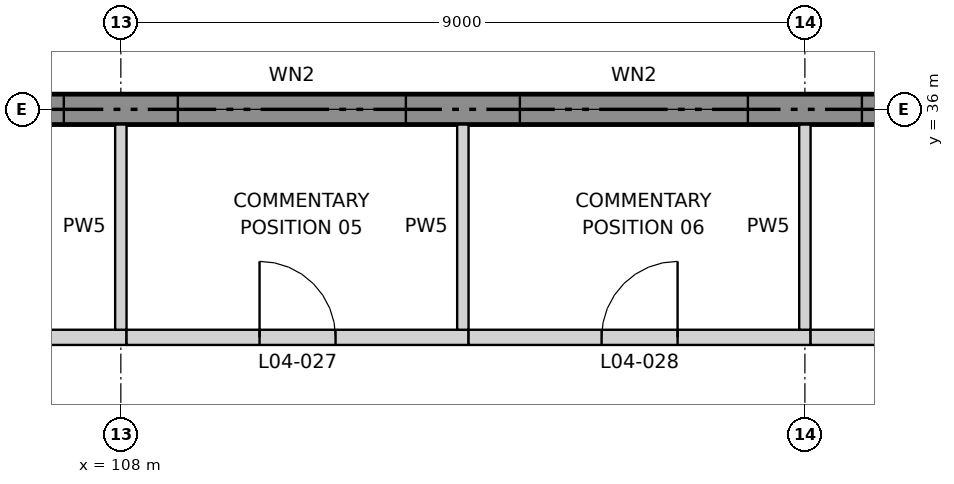
"""IFC4 building model, lengths in metres.
Left out: names, types, materials, properties, quantities, classifications, styles, units other than length and angle.
Written with IfcOpenShell. Run it as: python <this file> out.ifc"""

import sys

from ifc_helpers import new_model, si_unit, direction, frame, frame_2d, origin, place, context, subcontext, project, spatial, rectangle, extrude, element, fill, save


model = new_model("IFC4")
c1 = context("Model", 3, precision=1e-05, world=origin(), true_north=direction((0.0, 1.0)))
c2 = subcontext(c1, "Body", "Model", "MODEL_VIEW")
j1 = project(units=[si_unit("LENGTHUNIT", "METRE"), si_unit("PLANEANGLEUNIT", "RADIAN")], contexts=[c1])
p1 = place(None, origin())
s1 = spatial("IfcSite", under=j1, at=p1, CompositionType="ELEMENT")
p2 = place(p1, origin())
s2 = spatial("IfcBuilding", under=s1, at=p2, CompositionType="ELEMENT")
p3 = place(p2, frame((0.0, 0.0, 28.0)))
s3 = spatial("IfcBuildingStorey", under=s2, at=p3, CompositionType="ELEMENT", Elevation=28.0)
p4 = place(p3, frame((90.0, 36.0, 0.0), z_axis=(0.0, 0.0, 1.0), x_axis=(1.0, 0.0, 0.0)))
e1 = element("IfcWall", 1, at=p4, inside=s3, PredefinedType="SOLIDWALL", context=c2, shape_type="SweptSolid", body=[
    extrude(rectangle(XDim=81.0, YDim=0.4, at=frame_2d((40.5, 0.0))), origin(), (0.0, 0.0, 1.0), 5.5),
])
p5 = place(p4, frame((1.962, 0.0, 0.9)))
e2 = element("IfcOpeningElement", 2, at=p5, cuts=e1, PredefinedType="OPENING", context=c2, shape_type="SweptSolid", body=[
    extrude(rectangle(XDim=3.0, YDim=1.8, at=frame_2d((1.5, 0.9))), frame((0.0, 0.21, 0.0), z_axis=(0.0, -1.0, 0.0), x_axis=(1.0, 0.0, 0.0)), (0.0, 0.0, 1.0), 0.42),
])
p6 = place(p4, frame((5.25, 0.0, 0.9)))
e3 = element("IfcOpeningElement", 3, at=p6, cuts=e1, PredefinedType="OPENING", context=c2, shape_type="SweptSolid", body=[
    extrude(rectangle(XDim=3.0, YDim=1.8, at=frame_2d((1.5, 0.9))), frame((0.0, 0.21, 0.0), z_axis=(0.0, -1.0, 0.0), x_axis=(1.0, 0.0, 0.0)), (0.0, 0.0, 1.0), 0.42),
])
p7 = place(p4, frame((9.75, 0.0, 0.9)))
e4 = element("IfcOpeningElement", 4, at=p7, cuts=e1, PredefinedType="OPENING", context=c2, shape_type="SweptSolid", body=[
    extrude(rectangle(XDim=3.0, YDim=1.8, at=frame_2d((1.5, 0.9))), frame((0.0, 0.21, 0.0), z_axis=(0.0, -1.0, 0.0), x_axis=(1.0, 0.0, 0.0)), (0.0, 0.0, 1.0), 0.42),
])
p8 = place(p4, frame((14.25, 0.0, 0.9)))
e5 = element("IfcOpeningElement", 5, at=p8, cuts=e1, PredefinedType="OPENING", context=c2, shape_type="SweptSolid", body=[
    extrude(rectangle(XDim=3.0, YDim=1.8, at=frame_2d((1.5, 0.9))), frame((0.0, 0.21, 0.0), z_axis=(0.0, -1.0, 0.0), x_axis=(1.0, 0.0, 0.0)), (0.0, 0.0, 1.0), 0.42),
])
p9 = place(p4, frame((18.75, 0.0, 0.9)))
e6 = element("IfcOpeningElement", 6, at=p9, cuts=e1, PredefinedType="OPENING", context=c2, shape_type="SweptSolid", body=[
    extrude(rectangle(XDim=3.0, YDim=1.8, at=frame_2d((1.5, 0.9))), frame((0.0, 0.21, 0.0), z_axis=(0.0, -1.0, 0.0), x_axis=(1.0, 0.0, 0.0)), (0.0, 0.0, 1.0), 0.42),
])
p10 = place(p4, frame((23.25, 0.0, 0.9)))
e7 = element("IfcOpeningElement", 7, at=p10, cuts=e1, PredefinedType="OPENING", context=c2, shape_type="SweptSolid", body=[
    extrude(rectangle(XDim=3.0, YDim=1.8, at=frame_2d((1.5, 0.9))), frame((0.0, 0.21, 0.0), z_axis=(0.0, -1.0, 0.0), x_axis=(1.0, 0.0, 0.0)), (0.0, 0.0, 1.0), 0.42),
])
p11 = place(p4, frame((27.75, 0.0, 0.9)))
e8 = element("IfcOpeningElement", 8, at=p11, cuts=e1, PredefinedType="OPENING", context=c2, shape_type="SweptSolid", body=[
    extrude(rectangle(XDim=3.0, YDim=1.8, at=frame_2d((1.5, 0.9))), frame((0.0, 0.21, 0.0), z_axis=(0.0, -1.0, 0.0), x_axis=(1.0, 0.0, 0.0)), (0.0, 0.0, 1.0), 0.42),
])
p12 = place(p4, frame((32.238, 0.0, 0.9)))
e9 = element("IfcOpeningElement", 9, at=p12, cuts=e1, PredefinedType="OPENING", context=c2, shape_type="SweptSolid", body=[
    extrude(rectangle(XDim=3.0, YDim=1.8, at=frame_2d((1.5, 0.9))), frame((0.0, 0.21, 0.0), z_axis=(0.0, -1.0, 0.0), x_axis=(1.0, 0.0, 0.0)), (0.0, 0.0, 1.0), 0.42),
])
p13 = place(p4, frame((35.262, 0.0, 0.9)))
e10 = element("IfcOpeningElement", 10, at=p13, cuts=e1, PredefinedType="OPENING", context=c2, shape_type="SweptSolid", body=[
    extrude(rectangle(XDim=4.5, YDim=1.8, at=frame_2d((2.25, 0.9))), frame((0.0, 0.21, 0.0), z_axis=(0.0, -1.0, 0.0), x_axis=(1.0, 0.0, 0.0)), (0.0, 0.0, 1.0), 0.42),
])
p14 = place(p4, frame((41.262, 0.0, 0.9)))
e11 = element("IfcOpeningElement", 11, at=p14, cuts=e1, PredefinedType="OPENING", context=c2, shape_type="SweptSolid", body=[
    extrude(rectangle(XDim=4.5, YDim=1.8, at=frame_2d((2.25, 0.9))), frame((0.0, 0.21, 0.0), z_axis=(0.0, -1.0, 0.0), x_axis=(1.0, 0.0, 0.0)), (0.0, 0.0, 1.0), 0.42),
])
p15 = place(p4, frame((47.262, 0.0, 0.9)))
e12 = element("IfcOpeningElement", 12, at=p15, cuts=e1, PredefinedType="OPENING", context=c2, shape_type="SweptSolid", body=[
    extrude(rectangle(XDim=4.5, YDim=1.8, at=frame_2d((2.25, 0.9))), frame((0.0, 0.21, 0.0), z_axis=(0.0, -1.0, 0.0), x_axis=(1.0, 0.0, 0.0)), (0.0, 0.0, 1.0), 0.42),
])
p16 = place(p4, frame((53.262, 0.0, 0.9)))
e13 = element("IfcOpeningElement", 13, at=p16, cuts=e1, PredefinedType="OPENING", context=c2, shape_type="SweptSolid", body=[
    extrude(rectangle(XDim=4.5, YDim=1.8, at=frame_2d((2.25, 0.9))), frame((0.0, 0.21, 0.0), z_axis=(0.0, -1.0, 0.0), x_axis=(1.0, 0.0, 0.0)), (0.0, 0.0, 1.0), 0.42),
])
p17 = place(p4, frame((59.262, 0.0, 0.9)))
e14 = element("IfcOpeningElement", 14, at=p17, cuts=e1, PredefinedType="OPENING", context=c2, shape_type="SweptSolid", body=[
    extrude(rectangle(XDim=4.5, YDim=1.8, at=frame_2d((2.25, 0.9))), frame((0.0, 0.21, 0.0), z_axis=(0.0, -1.0, 0.0), x_axis=(1.0, 0.0, 0.0)), (0.0, 0.0, 1.0), 0.42),
])
p18 = place(p4, frame((75.9, 0.0, 0.0)))
e15 = element("IfcOpeningElement", 15, at=p18, cuts=e1, PredefinedType="OPENING", context=c2, shape_type="SweptSolid", body=[
    extrude(rectangle(XDim=1.2, YDim=2.1, at=frame_2d((0.6, 1.05))), frame((0.0, 0.21, 0.0), z_axis=(0.0, -1.0, 0.0), x_axis=(1.0, 0.0, 0.0)), (0.0, 0.0, 1.0), 0.42),
])
p19 = place(p4, frame((0.6, 0.0, 0.0)))
e16 = element("IfcOpeningElement", 16, at=p19, cuts=e1, PredefinedType="OPENING", context=c2, shape_type="SweptSolid", body=[
    extrude(rectangle(XDim=1.2, YDim=2.1, at=frame_2d((0.6, 1.05))), frame((0.0, 0.21, 0.0), z_axis=(0.0, -1.0, 0.0), x_axis=(1.0, 0.0, 0.0)), (0.0, 0.0, 1.0), 0.42),
])
p20 = place(p3, frame((103.575, 33.0, 0.0), z_axis=(0.0, 0.0, 1.0), x_axis=(1.0, 0.0, 0.0)))
e17 = element("IfcWall", 17, at=p20, inside=s3, PredefinedType="PARTITIONING", context=c2, shape_type="SweptSolid", body=[
    extrude(rectangle(XDim=4.5, YDim=0.2, at=frame_2d((2.25, 0.0))), origin(), (0.0, 0.0, 1.0), 5.5),
])
p21 = place(p20, frame((1.75, 0.0, 0.0)))
e18 = element("IfcOpeningElement", 18, at=p21, cuts=e17, PredefinedType="OPENING", context=c2, shape_type="SweptSolid", body=[
    extrude(rectangle(XDim=1.0, YDim=2.1, at=frame_2d((0.5, 1.05))), frame((0.0, 0.11, 0.0), z_axis=(0.0, -1.0, 0.0), x_axis=(1.0, 0.0, 0.0)), (0.0, 0.0, 1.0), 0.22),
])
p22 = place(p3, frame((108.075, 33.0, 0.0), z_axis=(0.0, 0.0, 1.0), x_axis=(1.0, 0.0, 0.0)))
e19 = element("IfcWall", 19, at=p22, inside=s3, PredefinedType="PARTITIONING", context=c2, shape_type="SweptSolid", body=[
    extrude(rectangle(XDim=4.5, YDim=0.2, at=frame_2d((2.25, 0.0))), origin(), (0.0, 0.0, 1.0), 5.5),
])
p23 = place(p22, frame((1.75, 0.0, 0.0)))
e20 = element("IfcOpeningElement", 20, at=p23, cuts=e19, PredefinedType="OPENING", context=c2, shape_type="SweptSolid", body=[
    extrude(rectangle(XDim=1.0, YDim=2.1, at=frame_2d((0.5, 1.05))), frame((0.0, 0.11, 0.0), z_axis=(0.0, -1.0, 0.0), x_axis=(1.0, 0.0, 0.0)), (0.0, 0.0, 1.0), 0.22),
])
p24 = place(p3, frame((112.575, 33.0, 0.0), z_axis=(0.0, 0.0, 1.0), x_axis=(1.0, 0.0, 0.0)))
e21 = element("IfcWall", 21, at=p24, inside=s3, PredefinedType="PARTITIONING", context=c2, shape_type="SweptSolid", body=[
    extrude(rectangle(XDim=4.5, YDim=0.2, at=frame_2d((2.25, 0.0))), origin(), (0.0, 0.0, 1.0), 5.5),
])
p25 = place(p24, frame((1.75, 0.0, 0.0)))
e22 = element("IfcOpeningElement", 22, at=p25, cuts=e21, PredefinedType="OPENING", context=c2, shape_type="SweptSolid", body=[
    extrude(rectangle(XDim=1.0, YDim=2.1, at=frame_2d((0.5, 1.05))), frame((0.0, 0.11, 0.0), z_axis=(0.0, -1.0, 0.0), x_axis=(1.0, 0.0, 0.0)), (0.0, 0.0, 1.0), 0.22),
])
p26 = place(p3, frame((117.075, 33.0, 0.0), z_axis=(0.0, 0.0, 1.0), x_axis=(1.0, 0.0, 0.0)))
e23 = element("IfcWall", 23, at=p26, inside=s3, PredefinedType="PARTITIONING", context=c2, shape_type="SweptSolid", body=[
    extrude(rectangle(XDim=4.5, YDim=0.2, at=frame_2d((2.25, 0.0))), origin(), (0.0, 0.0, 1.0), 5.5),
])
p27 = place(p26, frame((1.75, 0.0, 0.0)))
e24 = element("IfcOpeningElement", 24, at=p27, cuts=e23, PredefinedType="OPENING", context=c2, shape_type="SweptSolid", body=[
    extrude(rectangle(XDim=1.0, YDim=2.1, at=frame_2d((0.5, 1.05))), frame((0.0, 0.11, 0.0), z_axis=(0.0, -1.0, 0.0), x_axis=(1.0, 0.0, 0.0)), (0.0, 0.0, 1.0), 0.22),
])
p28 = place(p3, frame((108.0, 33.1, 0.0), z_axis=(0.0, 0.0, 1.0), x_axis=(0.0, 1.0, 0.0)))
e25 = element("IfcWall", 25, at=p28, inside=s3, PredefinedType="PARTITIONING", context=c2, shape_type="SweptSolid", body=[
    extrude(rectangle(XDim=2.7, YDim=0.15, at=frame_2d((1.35, 0.0))), origin(), (0.0, 0.0, 1.0), 4.2),
])
p29 = place(p3, frame((112.5, 33.1, 0.0), z_axis=(0.0, 0.0, 1.0), x_axis=(0.0, 1.0, 0.0)))
e26 = element("IfcWall", 26, at=p29, inside=s3, PredefinedType="PARTITIONING", context=c2, shape_type="SweptSolid", body=[
    extrude(rectangle(XDim=2.7, YDim=0.15, at=frame_2d((1.35, 0.0))), origin(), (0.0, 0.0, 1.0), 5.5),
])
p30 = place(p3, frame((117.0, 33.1, 0.0), z_axis=(0.0, 0.0, 1.0), x_axis=(0.0, 1.0, 0.0)))
e27 = element("IfcWall", 27, at=p30, inside=s3, PredefinedType="PARTITIONING", context=c2, shape_type="SweptSolid", body=[
    extrude(rectangle(XDim=2.7, YDim=0.15, at=frame_2d((1.35, 0.0))), origin(), (0.0, 0.0, 1.0), 4.2),
])
p31 = place(p23, origin())
e28 = element("IfcDoor", 28, at=p31, inside=s3, OperationType="SINGLE_SWING_LEFT", PredefinedType="DOOR", context=c2, shape_type="SweptSolid", body=[
    extrude(rectangle(XDim=1.0, YDim=2.1, at=frame_2d((0.5, 1.05))), frame((0.0, 0.025, 0.0), z_axis=(0.0, -1.0, 0.0), x_axis=(1.0, 0.0, 0.0)), (0.0, 0.0, 1.0), 0.05),
])
fill(e20, e28)
p32 = place(p25, origin())
e29 = element("IfcDoor", 29, at=p32, inside=s3, OperationType="SINGLE_SWING_RIGHT", PredefinedType="DOOR", context=c2, shape_type="SweptSolid", body=[
    extrude(rectangle(XDim=1.0, YDim=2.1, at=frame_2d((0.5, 1.05))), frame((0.0, 0.025, 0.0), z_axis=(0.0, -1.0, 0.0), x_axis=(1.0, 0.0, 0.0)), (0.0, 0.0, 1.0), 0.05),
])
fill(e22, e29)
p33 = place(p8, origin())
e30 = element("IfcWindow", 30, at=p33, inside=s3, PartitioningType="SINGLE_PANEL", PredefinedType="WINDOW", context=c2, shape_type="SweptSolid", body=[
    extrude(rectangle(XDim=3.0, YDim=1.8, at=frame_2d((1.5, 0.9))), frame((0.0, 0.03, 0.0), z_axis=(0.0, -1.0, 0.0), x_axis=(1.0, 0.0, 0.0)), (0.0, 0.0, 1.0), 0.06),
])
fill(e5, e30)
p34 = place(p9, origin())
e31 = element("IfcWindow", 31, at=p34, inside=s3, PartitioningType="SINGLE_PANEL", PredefinedType="WINDOW", context=c2, shape_type="SweptSolid", body=[
    extrude(rectangle(XDim=3.0, YDim=1.8, at=frame_2d((1.5, 0.9))), frame((0.0, 0.03, 0.0), z_axis=(0.0, -1.0, 0.0), x_axis=(1.0, 0.0, 0.0)), (0.0, 0.0, 1.0), 0.06),
])
fill(e6, e31)
p35 = place(p10, origin())
e32 = element("IfcWindow", 32, at=p35, inside=s3, PartitioningType="SINGLE_PANEL", PredefinedType="WINDOW", context=c2, shape_type="SweptSolid", body=[
    extrude(rectangle(XDim=3.0, YDim=1.8, at=frame_2d((1.5, 0.9))), frame((0.0, 0.03, 0.0), z_axis=(0.0, -1.0, 0.0), x_axis=(1.0, 0.0, 0.0)), (0.0, 0.0, 1.0), 0.06),
])
fill(e7, e32)
p36 = place(p11, origin())
e33 = element("IfcWindow", 33, at=p36, inside=s3, PartitioningType="SINGLE_PANEL", PredefinedType="WINDOW", context=c2, shape_type="SweptSolid", body=[
    extrude(rectangle(XDim=3.0, YDim=1.8, at=frame_2d((1.5, 0.9))), frame((0.0, 0.03, 0.0), z_axis=(0.0, -1.0, 0.0), x_axis=(1.0, 0.0, 0.0)), (0.0, 0.0, 1.0), 0.06),
])
fill(e8, e33)
save(model, sys.argv[1])
